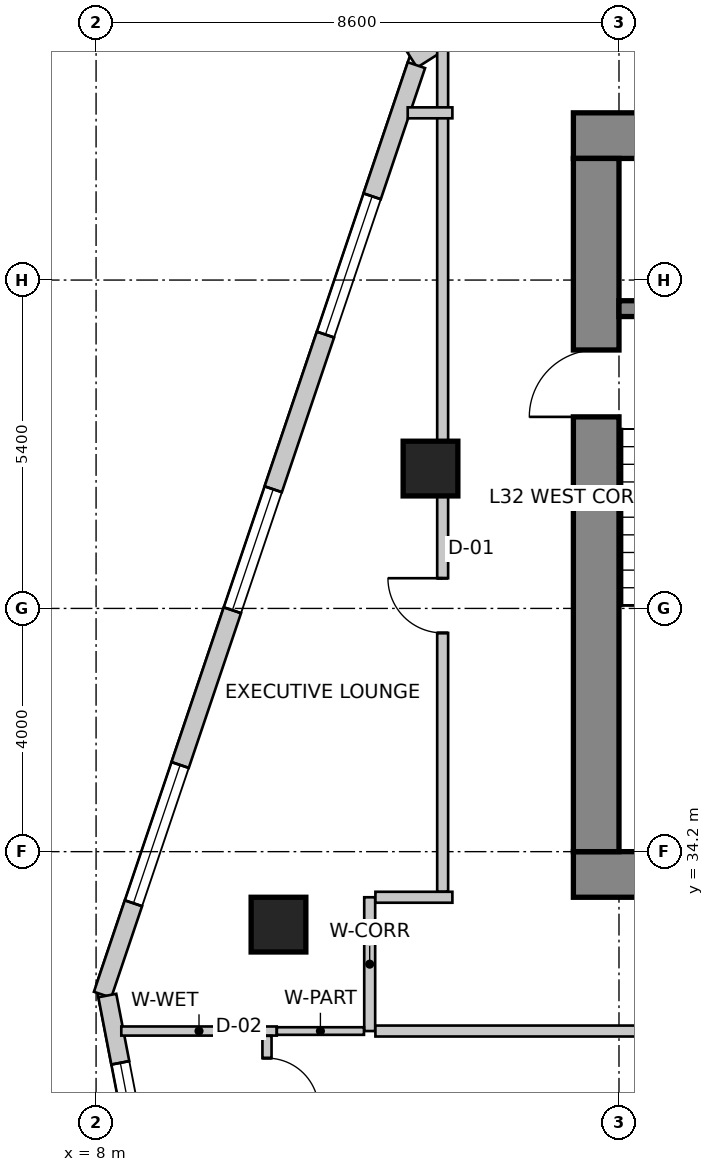
"""IFC4 building model, lengths in metres.
Left out: names, types, materials, properties, quantities, classifications, styles, units other than length and angle.
Written with IfcOpenShell. Run it as: python <this file> out.ifc"""

import sys

from ifc_helpers import new_model, si_unit, direction, frame, frame_2d, origin, origin_2d, place, context, subcontext, project, spatial, rectangle, extrude, source, transform, mapped, element, fill, save


model = new_model("IFC4")
c1 = context("Model", 3, precision=1e-05, world=origin(), true_north=direction((0.0, 1.0)))
c2 = subcontext(c1, "Body", "Model", "MODEL_VIEW")
j1 = project(units=[si_unit("LENGTHUNIT", "METRE"), si_unit("PLANEANGLEUNIT", "RADIAN")], contexts=[c1])
p1 = place(None, origin())
s1 = spatial("IfcSite", under=j1, at=p1, CompositionType="ELEMENT")
p2 = place(p1, origin())
s2 = spatial("IfcBuilding", under=s1, at=p2, CompositionType="ELEMENT")
p3 = place(p2, frame((0.0, 0.0, 132.2)))
s3 = spatial("IfcBuildingStorey", under=s2, at=p3, CompositionType="ELEMENT", Elevation=132.2)
p4 = place(p3, frame((15.85, 45.975, 0.0), z_axis=(0.0, 0.0, 1.0), x_axis=(1.0, 0.0, 0.0)))
e1 = element("IfcWall", 1, at=p4, inside=s3, PredefinedType="SHEAR", context=c2, shape_type="SweptSolid", body=[
    extrude(rectangle(XDim=15.9, YDim=0.75, at=frame_2d((7.95, 0.0))), origin(), (0.0, 0.0, 1.0), 3.6),
])
p5 = place(p3, frame((15.85, 33.825, 0.0), z_axis=(0.0, 0.0, 1.0), x_axis=(1.0, 0.0, 0.0)))
e2 = element("IfcWall", 2, at=p5, inside=s3, PredefinedType="SHEAR", context=c2, shape_type="SweptSolid", body=[
    extrude(rectangle(XDim=15.9, YDim=0.75, at=frame_2d((7.95, 0.0))), origin(), (0.0, 0.0, 1.0), 3.6),
])
m1 = source(origin(), c2, "Body", "SweptSolid", [
    extrude(rectangle(XDim=1.3, YDim=2.15, at=frame_2d((0.65, 1.075))), frame((0.0, 0.385, 0.0), z_axis=(0.0, -1.0, 0.0), x_axis=(1.0, 0.0, 0.0)), (0.0, 0.0, 1.0), 0.77),
])
p6 = place(p5, frame((10.08, 0.0, 0.0)))
e3 = element("IfcOpeningElement", 3, at=p6, cuts=e2, PredefinedType="OPENING", context=c2, shape_type="MappedRepresentation", body=[
    mapped(m1, transform((0.0, 0.0, 0.0), scale=1.0)),
])
p7 = place(p3, frame((16.225, 34.2, 0.0), z_axis=(0.0, 0.0, 1.0), x_axis=(0.0, 1.0, 0.0)))
e4 = element("IfcWall", 4, at=p7, inside=s3, PredefinedType="SHEAR", context=c2, shape_type="SweptSolid", body=[
    extrude(rectangle(XDim=11.4, YDim=0.75, at=frame_2d((5.7, 0.0))), origin(), (0.0, 0.0, 1.0), 3.6),
])
m2 = source(origin(), c2, "Body", "SweptSolid", [
    extrude(rectangle(XDim=1.1, YDim=2.15, at=frame_2d((0.55, 1.075))), frame((0.0, 0.385, 0.0), z_axis=(0.0, -1.0, 0.0), x_axis=(1.0, 0.0, 0.0)), (0.0, 0.0, 1.0), 0.77),
])
p8 = place(p7, frame((7.15, 0.0, 0.0)))
e5 = element("IfcOpeningElement", 5, at=p8, cuts=e4, PredefinedType="OPENING", context=c2, shape_type="MappedRepresentation", body=[
    mapped(m2, transform((0.0, 0.0, 0.0), scale=1.0)),
])
p9 = place(p3, frame((16.6, 43.13, 0.0), z_axis=(0.0, 0.0, 1.0), x_axis=(1.0, 0.0, 0.0)))
e6 = element("IfcWall", 6, at=p9, inside=s3, PredefinedType="SHEAR", context=c2, shape_type="SweptSolid", body=[
    extrude(rectangle(XDim=3.5, YDim=0.26, at=frame_2d((1.75, 0.0))), origin(), (0.0, 0.0, 1.0), 3.6),
])
m3 = source(origin(), c2, "Body", "SweptSolid", [
    extrude(rectangle(XDim=0.9, YDim=0.9, at=origin_2d()), origin(), (0.0, 0.0, 1.0), 3.6),
])
for number, where, z_axis, x_axis in (
    (7, (11.0, 33.0, 0.0), (0.0, 0.0, 1.0), (1.0, 0.0, 0.0)),
    (8, (13.5, 40.5, 0.0), (0.0, 0.0, 1.0), (1.0, 0.0, 0.0)),
):
    element("IfcColumn", number, at=place(p3, frame(where, z_axis=z_axis, x_axis=x_axis)), inside=s3, PredefinedType="COLUMN", context=c2, shape_type="MappedRepresentation", body=[
        mapped(m3, transform((0.0, 0.0, 0.0), scale=1.0)),
    ])
p10 = place(p3, frame((21.875, 52.742, 0.0), z_axis=(0.0, 0.0, 1.0), x_axis=(-0.843662465249, -0.536873956092, 0.0)))
e9 = element("IfcWall", 9, at=p10, inside=s3, PredefinedType="SOLIDWALL", context=c2, shape_type="SweptSolid", body=[
    extrude(rectangle(XDim=10.284, YDim=0.3, at=frame_2d((5.142, 0.0))), origin(), (0.0, 0.0, 1.0), 3.35),
])
m4 = source(origin(), c2, "Body", "SweptSolid", [
    extrude(rectangle(XDim=2.1, YDim=2.0, at=frame_2d((1.05, 1.0))), frame((0.0, 0.16, 0.0), z_axis=(0.0, -1.0, 0.0), x_axis=(1.0, 0.0, 0.0)), (0.0, 0.0, 1.0), 0.32),
])
p11 = place(p10, frame((2.806, 0.0, 0.85)))
e10 = element("IfcOpeningElement", 10, at=p11, cuts=e9, PredefinedType="OPENING", context=c2, shape_type="MappedRepresentation", body=[
    mapped(m4, transform((0.0, 0.0, 0.0), scale=1.0)),
])
m5 = source(origin(), c2, "Body", "SweptSolid", [
    extrude(rectangle(XDim=1.2, YDim=1.6, at=frame_2d((0.6, 0.8))), frame((0.0, 0.16, 0.0), z_axis=(0.0, -1.0, 0.0), x_axis=(1.0, 0.0, 0.0)), (0.0, 0.0, 1.0), 0.32),
])
p12 = place(p10, frame((8.087, 0.0, 0.85)))
e11 = element("IfcOpeningElement", 11, at=p12, cuts=e9, PredefinedType="OPENING", context=c2, shape_type="MappedRepresentation", body=[
    mapped(m5, transform((0.0, 0.0, 0.0), scale=1.0)),
])
p13 = place(p3, frame((13.269, 47.134, 0.0), z_axis=(0.0, 0.0, 1.0), x_axis=(-0.319929596295, -0.947441319246, 0.0)))
e12 = element("IfcWall", 12, at=p13, inside=s3, PredefinedType="SOLIDWALL", context=c2, shape_type="SweptSolid", body=[
    extrude(rectangle(XDim=16.134, YDim=0.3, at=frame_2d((8.067, 0.0))), origin(), (0.0, 0.0, 1.0), 3.35),
])
m6 = source(origin(), c2, "Body", "SweptSolid", [
    extrude(rectangle(XDim=2.4, YDim=2.2, at=frame_2d((1.2, 1.1))), frame((0.0, 0.16, 0.0), z_axis=(0.0, -1.0, 0.0), x_axis=(1.0, 0.0, 0.0)), (0.0, 0.0, 1.0), 0.32),
])
p14 = place(p13, frame((2.276, 0.0, 0.85)))
e13 = element("IfcOpeningElement", 13, at=p14, cuts=e12, PredefinedType="OPENING", context=c2, shape_type="MappedRepresentation", body=[
    mapped(m6, transform((0.0, 0.0, 0.0), scale=1.0)),
])
p15 = place(p13, frame((7.361, 0.0, 0.85)))
e14 = element("IfcOpeningElement", 14, at=p15, cuts=e12, PredefinedType="OPENING", context=c2, shape_type="MappedRepresentation", body=[
    mapped(m4, transform((0.0, 0.0, 0.0), scale=1.0)),
])
p16 = place(p13, frame((12.147, 0.0, 0.85)))
e15 = element("IfcOpeningElement", 15, at=p16, cuts=e12, PredefinedType="OPENING", context=c2, shape_type="MappedRepresentation", body=[
    mapped(m6, transform((0.0, 0.0, 0.0), scale=1.0)),
])
p17 = place(p3, frame((8.185, 31.834, 0.0), z_axis=(0.0, 0.0, 1.0), x_axis=(0.189707113148, -0.981840725994, 0.0)))
e16 = element("IfcWall", 16, at=p17, inside=s3, PredefinedType="SOLIDWALL", context=c2, shape_type="SweptSolid", body=[
    extrude(rectangle(XDim=21.221, YDim=0.3, at=frame_2d((10.611, 0.0))), origin(), (0.0, 0.0, 1.0), 3.35),
])
p18 = place(p17, frame((1.127, 0.0, 0.85)))
e17 = element("IfcOpeningElement", 17, at=p18, cuts=e16, PredefinedType="OPENING", context=c2, shape_type="MappedRepresentation", body=[
    mapped(m5, transform((0.0, 0.0, 0.0), scale=1.0)),
])
p19 = place(p17, frame((4.369, 0.0, 0.85)))
e18 = element("IfcOpeningElement", 18, at=p19, cuts=e16, PredefinedType="OPENING", context=c2, shape_type="MappedRepresentation", body=[
    mapped(m4, transform((0.0, 0.0, 0.0), scale=1.0)),
])
p20 = place(p17, frame((8.521, 0.0, 0.85)))
e19 = element("IfcOpeningElement", 19, at=p20, cuts=e16, PredefinedType="OPENING", context=c2, shape_type="MappedRepresentation", body=[
    mapped(m5, transform((0.0, 0.0, 0.0), scale=1.0)),
])
p21 = place(p17, frame((12.654, 0.0, 0.85)))
e20 = element("IfcOpeningElement", 20, at=p21, cuts=e16, PredefinedType="OPENING", context=c2, shape_type="MappedRepresentation", body=[
    mapped(m4, transform((0.0, 0.0, 0.0), scale=1.0)),
])
p22 = place(p17, frame((18.094, 0.0, 0.85)))
e21 = element("IfcOpeningElement", 21, at=p22, cuts=e16, PredefinedType="OPENING", context=c2, shape_type="MappedRepresentation", body=[
    mapped(m4, transform((0.0, 0.0, 0.0), scale=1.0)),
])
p23 = place(p3, frame((12.5, 31.25, 0.0), z_axis=(0.0, 0.0, 1.0), x_axis=(0.0, 1.0, 0.0)))
e22 = element("IfcWall", 22, at=p23, inside=s3, PredefinedType="PARTITIONING", context=c2, shape_type="SweptSolid", body=[
    extrude(rectangle(XDim=2.2, YDim=0.18, at=frame_2d((1.1, 0.0))), origin(), (0.0, 0.0, 1.0), 3.034),
])
p24 = place(p3, frame((12.594, 33.45, 0.0), z_axis=(0.0, 0.0, 1.0), x_axis=(1.0, 0.0, 0.0)))
e23 = element("IfcWall", 23, at=p24, inside=s3, PredefinedType="PARTITIONING", context=c2, shape_type="SweptSolid", body=[
    extrude(rectangle(XDim=1.266, YDim=0.18, at=frame_2d((0.633, 0.0))), origin(), (0.0, 0.0, 1.0), 3.35),
])
p25 = place(p3, frame((17.96, 31.25, 0.0), z_axis=(0.0, 0.0, 1.0), x_axis=(-1.0, 0.0, 0.0)))
e24 = element("IfcWall", 24, at=p25, inside=s3, PredefinedType="PARTITIONING", context=c2, shape_type="SweptSolid", body=[
    extrude(rectangle(XDim=5.366, YDim=0.18, at=frame_2d((2.683, 0.0))), origin(), (0.0, 0.0, 1.0), 3.034),
])
p26 = place(p3, frame((13.7, 33.544, 0.0), z_axis=(0.0, 0.0, 1.0), x_axis=(0.0, 1.0, 0.0)))
e25 = element("IfcWall", 25, at=p26, inside=s3, PredefinedType="PARTITIONING", context=c2, shape_type="SweptSolid", body=[
    extrude(rectangle(XDim=13.86, YDim=0.18, at=frame_2d((6.93, 0.0))), origin(), (0.0, 0.0, 1.0), 2.492),
])
m7 = source(origin(), c2, "Body", "SweptSolid", [
    extrude(rectangle(XDim=0.9, YDim=2.15, at=frame_2d((0.45, 1.075))), frame((0.0, 0.1, 0.0), z_axis=(0.0, -1.0, 0.0), x_axis=(1.0, 0.0, 0.0)), (0.0, 0.0, 1.0), 0.2),
])
p27 = place(p26, frame((4.253, 0.0, 0.0)))
e26 = element("IfcOpeningElement", 26, at=p27, cuts=e25, PredefinedType="OPENING", context=c2, shape_type="MappedRepresentation", body=[
    mapped(m7, transform((0.0, 0.0, 0.0), scale=1.0)),
])
p28 = place(p3, frame((13.86, 46.35, 0.0), z_axis=(0.0, 0.0, 1.0), x_axis=(-1.0, 0.0, 0.0)))
e27 = element("IfcWall", 27, at=p28, inside=s3, PredefinedType="PARTITIONING", context=c2, shape_type="SweptSolid", body=[
    extrude(rectangle(XDim=0.735, YDim=0.18, at=frame_2d((0.367, 0.0))), origin(), (0.0, 0.0, 1.0), 3.35),
])
p29 = place(p3, frame((10.971, 31.25, 0.0), z_axis=(0.0, 0.0, 1.0), x_axis=(-1.0, 0.0, 0.0)))
e28 = element("IfcWall", 28, at=p29, inside=s3, PredefinedType="PARTITIONING", context=c2, shape_type="SweptSolid", body=[
    extrude(rectangle(XDim=2.556, YDim=0.15, at=frame_2d((1.278, 0.0))), origin(), (0.0, 0.0, 1.0), 2.492),
])
p30 = place(p3, frame((12.406, 31.25, 0.0), z_axis=(0.0, 0.0, 1.0), x_axis=(-1.0, 0.0, 0.0)))
e29 = element("IfcWall", 29, at=p30, inside=s3, PredefinedType="PARTITIONING", context=c2, shape_type="SweptSolid", body=[
    extrude(rectangle(XDim=1.433, YDim=0.125, at=frame_2d((0.717, 0.0))), origin(), (0.0, 0.0, 1.0), 2.492),
])
p31 = place(p3, frame((10.811, 31.171, 0.0), z_axis=(0.0, 0.0, 1.0), x_axis=(0.0, -1.0, 0.0)))
e30 = element("IfcWall", 30, at=p31, inside=s3, PredefinedType="PARTITIONING", context=c2, shape_type="SweptSolid", body=[
    extrude(rectangle(XDim=2.101, YDim=0.15, at=frame_2d((1.05, 0.0))), origin(), (0.0, 0.0, 1.0), 2.492),
])
m8 = source(origin(), c2, "Body", "SweptSolid", [
    extrude(rectangle(XDim=0.85, YDim=2.15, at=frame_2d((0.425, 1.075))), frame((0.0, 0.085, 0.0), z_axis=(0.0, -1.0, 0.0), x_axis=(1.0, 0.0, 0.0)), (0.0, 0.0, 1.0), 0.17),
])
p32 = place(p31, frame((0.366, 0.0, 0.0)))
e31 = element("IfcOpeningElement", 31, at=p32, cuts=e30, PredefinedType="OPENING", context=c2, shape_type="MappedRepresentation", body=[
    mapped(m8, transform((0.0, 0.0, 0.0), scale=1.0)),
])
m9 = source(origin(), c2, "Body", "SweptSolid", [
    extrude(rectangle(XDim=2.4, YDim=2.2, at=frame_2d((1.2, 1.1))), frame((0.0, -0.015, 0.0), z_axis=(0.0, -1.0, 0.0), x_axis=(1.0, 0.0, 0.0)), (0.0, 0.0, 1.0), 0.06),
])
p33 = place(p14, origin())
e32 = element("IfcWindow", 32, at=p33, inside=s3, PartitioningType="SINGLE_PANEL", PredefinedType="WINDOW", context=c2, shape_type="MappedRepresentation", body=[
    mapped(m9, transform((0.0, 0.0, 0.0), scale=1.0)),
])
fill(e13, e32)
m10 = source(origin(), c2, "Body", "SweptSolid", [
    extrude(rectangle(XDim=2.1, YDim=2.0, at=frame_2d((1.05, 1.0))), frame((0.0, -0.015, 0.0), z_axis=(0.0, -1.0, 0.0), x_axis=(1.0, 0.0, 0.0)), (0.0, 0.0, 1.0), 0.06),
])
p34 = place(p15, origin())
e33 = element("IfcWindow", 33, at=p34, inside=s3, PartitioningType="SINGLE_PANEL", PredefinedType="WINDOW", context=c2, shape_type="MappedRepresentation", body=[
    mapped(m10, transform((0.0, 0.0, 0.0), scale=1.0)),
])
fill(e14, e33)
p35 = place(p16, origin())
e34 = element("IfcWindow", 34, at=p35, inside=s3, PartitioningType="SINGLE_PANEL", PredefinedType="WINDOW", context=c2, shape_type="MappedRepresentation", body=[
    mapped(m9, transform((0.0, 0.0, 0.0), scale=1.0)),
])
fill(e15, e34)
m11 = source(origin(), c2, "Body", "SweptSolid", [
    extrude(rectangle(XDim=1.2, YDim=1.6, at=frame_2d((0.6, 0.8))), frame((0.0, -0.015, 0.0), z_axis=(0.0, -1.0, 0.0), x_axis=(1.0, 0.0, 0.0)), (0.0, 0.0, 1.0), 0.06),
])
p36 = place(p18, origin())
e35 = element("IfcWindow", 35, at=p36, inside=s3, PartitioningType="SINGLE_PANEL", PredefinedType="WINDOW", context=c2, shape_type="MappedRepresentation", body=[
    mapped(m11, transform((0.0, 0.0, 0.0), scale=1.0)),
])
fill(e17, e35)
m12 = source(origin(), c2, "Body", "SweptSolid", [
    extrude(rectangle(XDim=1.1, YDim=2.15, at=frame_2d((0.55, 1.075))), frame((0.0, 0.025, 0.0), z_axis=(0.0, -1.0, 0.0), x_axis=(1.0, 0.0, 0.0)), (0.0, 0.0, 1.0), 0.05),
])
p37 = place(p8, origin())
e36 = element("IfcDoor", 36, at=p37, inside=s3, OperationType="SINGLE_SWING_LEFT", PredefinedType="DOOR", context=c2, shape_type="MappedRepresentation", body=[
    mapped(m12, transform((0.0, 0.0, 0.0), scale=1.0)),
])
fill(e5, e36)
m13 = source(origin(), c2, "Body", "SweptSolid", [
    extrude(rectangle(XDim=0.9, YDim=2.15, at=frame_2d((0.45, 1.075))), frame((0.0, 0.025, 0.0), z_axis=(0.0, -1.0, 0.0), x_axis=(1.0, 0.0, 0.0)), (0.0, 0.0, 1.0), 0.05),
])
p38 = place(p27, origin())
e37 = element("IfcDoor", 37, at=p38, inside=s3, OperationType="SINGLE_SWING_RIGHT", PredefinedType="DOOR", context=c2, shape_type="MappedRepresentation", body=[
    mapped(m13, transform((0.0, 0.0, 0.0), scale=1.0)),
])
fill(e26, e37)
m14 = source(origin(), c2, "Body", "SweptSolid", [
    extrude(rectangle(XDim=0.85, YDim=2.15, at=frame_2d((0.425, 1.075))), frame((0.0, 0.025, 0.0), z_axis=(0.0, -1.0, 0.0), x_axis=(1.0, 0.0, 0.0)), (0.0, 0.0, 1.0), 0.05),
])
p39 = place(p32, origin())
e38 = element("IfcDoor", 38, at=p39, inside=s3, OperationType="SINGLE_SWING_RIGHT", PredefinedType="DOOR", context=c2, shape_type="MappedRepresentation", body=[
    mapped(m14, transform((0.0, 0.0, 0.0), scale=1.0)),
])
fill(e31, e38)
save(model, sys.argv[1])
